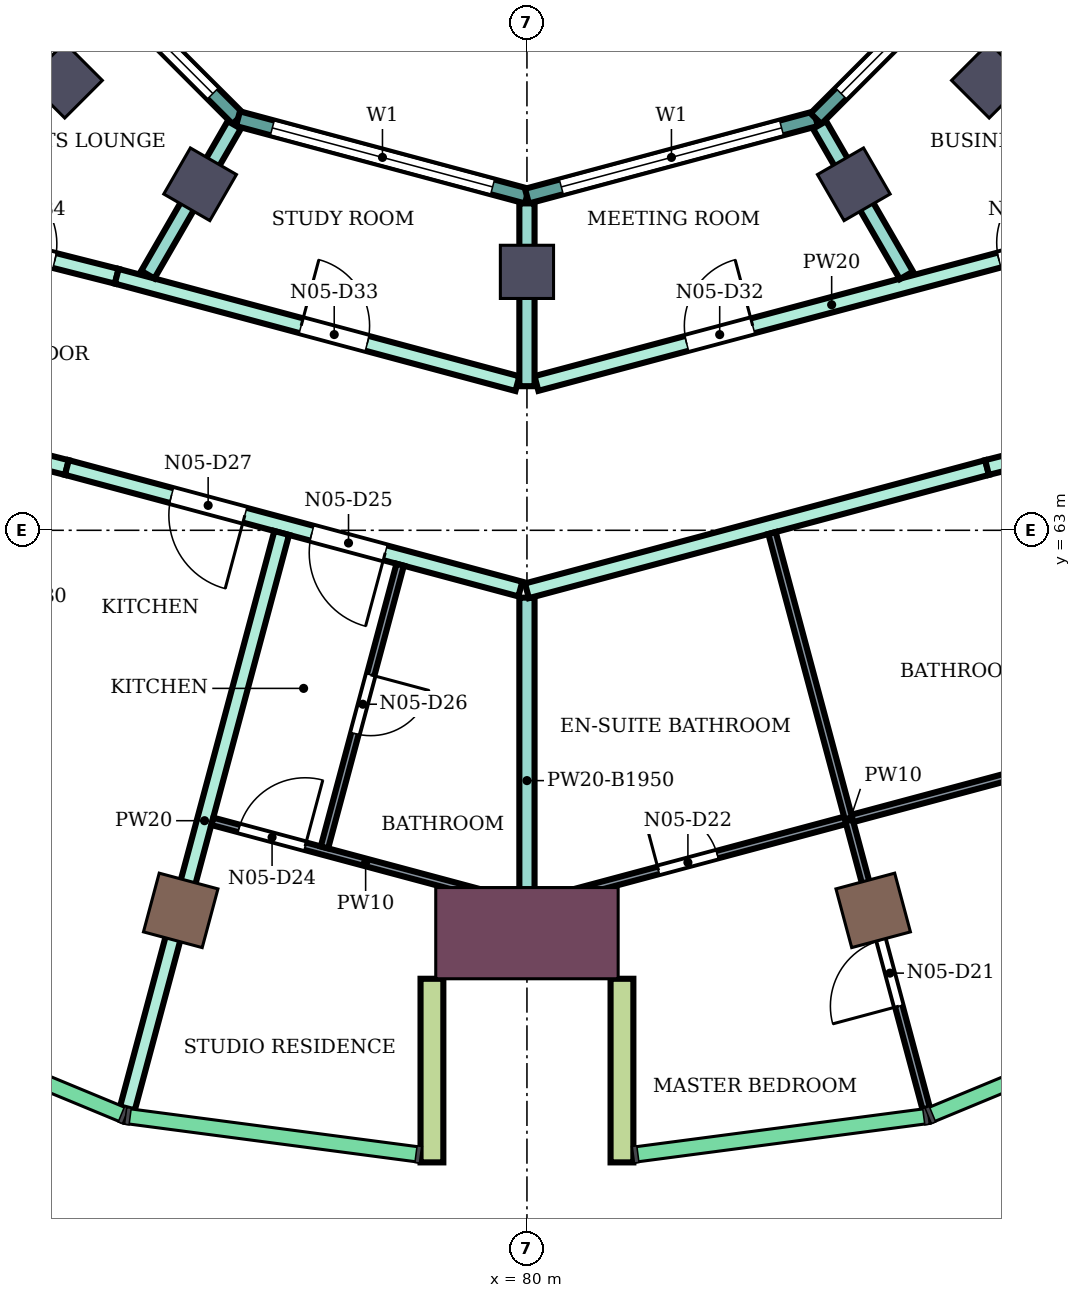
"""IFC4 building model, lengths in metres.
Left out: names, types, materials, properties, quantities, classifications, styles, units other than length and angle.
Written with IfcOpenShell. Run it as: python <this file> out.ifc"""

import sys

from ifc_helpers import new_model, si_unit, direction, frame, frame_2d, origin, origin_2d, place, context, subcontext, project, spatial, rectangle, extrude, element, fill, save


model = new_model("IFC4")
c1 = context("Model", 3, precision=1e-05, world=origin(), true_north=direction((0.0, 1.0)))
c2 = subcontext(c1, "Body", "Model", "MODEL_VIEW")
j1 = project(units=[si_unit("LENGTHUNIT", "METRE"), si_unit("PLANEANGLEUNIT", "RADIAN")], contexts=[c1])
p1 = place(None, origin())
s1 = spatial("IfcSite", under=j1, at=p1, CompositionType="ELEMENT")
p2 = place(p1, origin())
s2 = spatial("IfcBuilding", under=s1, at=p2, CompositionType="ELEMENT")
p3 = place(p2, frame((0.0, 0.0, 323.7)))
s3 = spatial("IfcBuildingStorey", under=s2, at=p3, CompositionType="ELEMENT", Elevation=323.7)
for number, where, z_axis, x_axis in (
    (1, (75.445, 58.0, 0.0), (0.0, 0.0, 1.0), (-0.259, -0.966, 0.0)),
    (2, (84.555, 58.0, 0.0), (0.0, 0.0, 1.0), (0.259, -0.966, 0.0)),
):
    element("IfcColumn", number, at=place(p3, frame(where, z_axis=z_axis, x_axis=x_axis)), inside=s3, PredefinedType="COLUMN", context=c2, shape_type="SweptSolid", body=[
        extrude(rectangle(XDim=0.8, YDim=0.8, at=origin_2d()), origin(), (0.0, 0.0, 1.0), 4.4),
    ])
for number, where, z_axis, x_axis in (
    (3, (73.919, 68.919, 0.0), (0.0, 0.0, 1.0), (-0.707, -0.707, 0.0)),
    (4, (75.7, 67.552, 0.0), (0.0, 0.0, 1.0), (-0.5, -0.866, 0.0)),
    (5, (80.0, 66.4, 0.0), (0.0, 0.0, 1.0), (0.0, -1.0, 0.0)),
    (6, (84.3, 67.552, 0.0), (0.0, 0.0, 1.0), (0.5, -0.866, 0.0)),
    (7, (86.081, 68.919, 0.0), (0.0, 0.0, 1.0), (0.707, -0.707, 0.0)),
):
    element("IfcColumn", number, at=place(p3, frame(where, z_axis=z_axis, x_axis=x_axis)), inside=s3, PredefinedType="COLUMN", context=c2, shape_type="SweptSolid", body=[
        extrude(rectangle(XDim=0.7, YDim=0.7, at=origin_2d()), origin(), (0.0, 0.0, 1.0), 4.4),
    ])
p4 = place(p3, frame((80.0, 57.7, 0.0), z_axis=(0.0, 0.0, 1.0), x_axis=(0.0, -1.0, 0.0)))
e8 = element("IfcColumn", 8, at=p4, inside=s3, PredefinedType="COLUMN", context=c2, shape_type="SweptSolid", body=[
    extrude(rectangle(XDim=1.2, YDim=2.4, at=origin_2d()), origin(), (0.0, 0.0, 1.0), 4.4),
])
for number, where, z_axis, x_axis in (
    (9, (78.75, 57.1, 0.0), (0.0, 0.0, 1.0), (0.0, -1.0, 0.0)),
    (10, (81.25, 57.1, 0.0), (0.0, 0.0, 1.0), (0.0, -1.0, 0.0)),
):
    element("IfcWall", number, at=place(p3, frame(where, z_axis=z_axis, x_axis=x_axis)), inside=s3, PredefinedType="NOTDEFINED", context=c2, shape_type="SweptSolid", body=[
        extrude(rectangle(XDim=2.416, YDim=0.3, at=frame_2d((1.208, 0.0))), origin(), (0.0, 0.0, 1.0), 4.4),
    ])
p5 = place(p3, frame((73.415, 71.198, 0.0), z_axis=(0.0, 0.0, 1.0), x_axis=(0.707106781187, -0.707106781187, 0.0)))
e11 = element("IfcWall", 11, at=p5, inside=s3, PredefinedType="NOTDEFINED", context=c2, shape_type="SweptSolid", body=[
    extrude(rectangle(XDim=3.936, YDim=0.2, at=frame_2d((1.968, 0.0))), origin(), (0.0, 0.0, 1.0), 4.4),
])
p6 = place(p5, frame((0.468, 0.0, 0.9)))
e12 = element("IfcOpeningElement", 12, at=p6, cuts=e11, PredefinedType="OPENING", context=c2, shape_type="SweptSolid", body=[
    extrude(rectangle(XDim=3.0, YDim=2.3, at=frame_2d((1.5, 1.15))), frame((0.0, 0.11, 0.0), z_axis=(0.0, -1.0, 0.0), x_axis=(1.0, 0.0, 0.0)), (0.0, 0.0, 1.0), 0.22),
])
p7 = place(p3, frame((76.198, 68.415, 0.0), z_axis=(0.0, 0.0, 1.0), x_axis=(0.965933654434, -0.258789828301, 0.0)))
e13 = element("IfcWall", 13, at=p7, inside=s3, PredefinedType="NOTDEFINED", context=c2, shape_type="SweptSolid", body=[
    extrude(rectangle(XDim=3.936, YDim=0.2, at=frame_2d((1.968, 0.0))), origin(), (0.0, 0.0, 1.0), 4.4),
])
p8 = place(p7, frame((0.468, 0.0, 0.9)))
e14 = element("IfcOpeningElement", 14, at=p8, cuts=e13, PredefinedType="OPENING", context=c2, shape_type="SweptSolid", body=[
    extrude(rectangle(XDim=3.0, YDim=2.3, at=frame_2d((1.5, 1.15))), frame((0.0, 0.11, 0.0), z_axis=(0.0, -1.0, 0.0), x_axis=(1.0, 0.0, 0.0)), (0.0, 0.0, 1.0), 0.22),
])
p9 = place(p3, frame((80.0, 67.396, 0.0), z_axis=(0.0, 0.0, 1.0), x_axis=(0.965933654434, 0.258789828301, 0.0)))
e15 = element("IfcWall", 15, at=p9, inside=s3, PredefinedType="NOTDEFINED", context=c2, shape_type="SweptSolid", body=[
    extrude(rectangle(XDim=3.936, YDim=0.2, at=frame_2d((1.968, 0.0))), origin(), (0.0, 0.0, 1.0), 4.4),
])
p10 = place(p9, frame((0.468, 0.0, 0.9)))
e16 = element("IfcOpeningElement", 16, at=p10, cuts=e15, PredefinedType="OPENING", context=c2, shape_type="SweptSolid", body=[
    extrude(rectangle(XDim=3.0, YDim=2.3, at=frame_2d((1.5, 1.15))), frame((0.0, 0.11, 0.0), z_axis=(0.0, -1.0, 0.0), x_axis=(1.0, 0.0, 0.0)), (0.0, 0.0, 1.0), 0.22),
])
p11 = place(p3, frame((83.802, 68.415, 0.0), z_axis=(0.0, 0.0, 1.0), x_axis=(0.707106781187, 0.707106781187, 0.0)))
e17 = element("IfcWall", 17, at=p11, inside=s3, PredefinedType="NOTDEFINED", context=c2, shape_type="SweptSolid", body=[
    extrude(rectangle(XDim=3.936, YDim=0.2, at=frame_2d((1.968, 0.0))), origin(), (0.0, 0.0, 1.0), 4.4),
])
p12 = place(p11, frame((0.468, 0.0, 0.9)))
e18 = element("IfcOpeningElement", 18, at=p12, cuts=e17, PredefinedType="OPENING", context=c2, shape_type="SweptSolid", body=[
    extrude(rectangle(XDim=3.0, YDim=2.3, at=frame_2d((1.5, 1.15))), frame((0.0, 0.11, 0.0), z_axis=(0.0, -1.0, 0.0), x_axis=(1.0, 0.0, 0.0)), (0.0, 0.0, 1.0), 0.22),
])
p13 = place(p3, frame((68.201, 65.28, 0.0), z_axis=(0.0, 0.0, 1.0), x_axis=(0.969421088032, -0.245403247897, 0.0)))
e19 = element("IfcWall", 19, at=p13, inside=s3, PredefinedType="PARTITIONING", context=c2, shape_type="SweptSolid", body=[
    extrude(rectangle(XDim=5.927, YDim=0.2, at=frame_2d((2.964, 0.0))), origin(), (0.0, 0.0, 1.0), 3.95),
])
p14 = place(p3, frame((72.1, 66.975, 0.0), z_axis=(0.0, 0.0, 1.0), x_axis=(0.969471314457, -0.245204752086, 0.0)))
e20 = element("IfcWall", 20, at=p14, inside=s3, PredefinedType="PARTITIONING", context=c2, shape_type="SweptSolid", body=[
    extrude(rectangle(XDim=2.582, YDim=0.2, at=frame_2d((1.291, 0.0))), origin(), (0.0, 0.0, 1.0), 3.95),
])
p15 = place(p14, frame((0.841, 0.0, 0.0)))
e21 = element("IfcOpeningElement", 21, at=p15, cuts=e20, PredefinedType="OPENING", context=c2, shape_type="SweptSolid", body=[
    extrude(rectangle(XDim=0.9, YDim=2.1, at=frame_2d((0.45, 1.05))), frame((0.0, 0.11, 0.0), z_axis=(0.0, -1.0, 0.0), x_axis=(1.0, 0.0, 0.0)), (0.0, 0.0, 1.0), 0.22),
])
p16 = place(p3, frame((73.947, 63.826, 0.0), z_axis=(0.0, 0.0, 1.0), x_axis=(0.965894934009, -0.25893430915, 0.0)))
e22 = element("IfcWall", 22, at=p16, inside=s3, PredefinedType="PARTITIONING", context=c2, shape_type="SweptSolid", body=[
    extrude(rectangle(XDim=6.177, YDim=0.2, at=frame_2d((3.088, 0.0))), origin(), (0.0, 0.0, 1.0), 3.95),
])
p17 = place(p16, frame((3.336, 0.0, 0.0)))
e23 = element("IfcOpeningElement", 23, at=p17, cuts=e22, PredefinedType="OPENING", context=c2, shape_type="SweptSolid", body=[
    extrude(rectangle(XDim=1.0, YDim=2.1, at=frame_2d((0.5, 1.05))), frame((0.0, 0.11, 0.0), z_axis=(0.0, -1.0, 0.0), x_axis=(1.0, 0.0, 0.0)), (0.0, 0.0, 1.0), 0.22),
])
p18 = place(p16, frame((1.424, 0.0, 0.0)))
e24 = element("IfcOpeningElement", 24, at=p18, cuts=e22, PredefinedType="OPENING", context=c2, shape_type="SweptSolid", body=[
    extrude(rectangle(XDim=1.0, YDim=2.1, at=frame_2d((0.5, 1.05))), frame((0.0, 0.11, 0.0), z_axis=(0.0, -1.0, 0.0), x_axis=(1.0, 0.0, 0.0)), (0.0, 0.0, 1.0), 0.22),
])
p19 = place(p3, frame((74.603, 66.342, 0.0), z_axis=(0.0, 0.0, 1.0), x_axis=(0.965920893652, -0.258837453254, 0.0)))
e25 = element("IfcWall", 25, at=p19, inside=s3, PredefinedType="PARTITIONING", context=c2, shape_type="SweptSolid", body=[
    extrude(rectangle(XDim=5.458, YDim=0.2, at=frame_2d((2.729, 0.0))), origin(), (0.0, 0.0, 1.0), 3.95),
])
p20 = place(p19, frame((2.512, 0.0, 0.0)))
e26 = element("IfcOpeningElement", 26, at=p20, cuts=e25, PredefinedType="OPENING", context=c2, shape_type="SweptSolid", body=[
    extrude(rectangle(XDim=0.9, YDim=2.1, at=frame_2d((0.45, 1.05))), frame((0.0, 0.11, 0.0), z_axis=(0.0, -1.0, 0.0), x_axis=(1.0, 0.0, 0.0)), (0.0, 0.0, 1.0), 0.22),
])
p21 = place(p3, frame((74.743, 55.394, 0.0), z_axis=(0.0, 0.0, 1.0), x_axis=(0.258969103378, 0.965885605802, 0.0)))
e27 = element("IfcWall", 27, at=p21, inside=s3, PredefinedType="PARTITIONING", context=c2, shape_type="SweptSolid", body=[
    extrude(rectangle(XDim=7.838, YDim=0.2, at=frame_2d((3.919, 0.0))), origin(), (0.0, 0.0, 1.0), 3.95),
])
p22 = place(p3, frame((75.012, 66.363, 0.0), z_axis=(0.0, 0.0, 1.0), x_axis=(0.500143511652, 0.865942531438, 0.0)))
e28 = element("IfcWall", 28, at=p22, inside=s3, PredefinedType="PARTITIONING", context=c2, shape_type="SweptSolid", body=[
    extrude(rectangle(XDim=2.275, YDim=0.2, at=frame_2d((1.138, 0.0))), origin(), (0.0, 0.0, 1.0), 2.45),
])
p23 = place(p3, frame((80.125, 64.932, 0.0), z_axis=(0.0, 0.0, 1.0), x_axis=(0.966236955806, 0.257655089674, 0.0)))
e29 = element("IfcWall", 29, at=p23, inside=s3, PredefinedType="PARTITIONING", context=c2, shape_type="SweptSolid", body=[
    extrude(rectangle(XDim=8.039, YDim=0.2, at=frame_2d((4.02, 0.0))), origin(), (0.0, 0.0, 1.0), 3.95),
])
p24 = place(p23, frame((6.298, 0.0, 0.0)))
e30 = element("IfcOpeningElement", 30, at=p24, cuts=e29, PredefinedType="OPENING", context=c2, shape_type="SweptSolid", body=[
    extrude(rectangle(XDim=0.9, YDim=2.1, at=frame_2d((0.45, 1.05))), frame((0.0, 0.11, 0.0), z_axis=(0.0, -1.0, 0.0), x_axis=(1.0, 0.0, 0.0)), (0.0, 0.0, 1.0), 0.22),
])
p25 = place(p23, frame((2.045, 0.0, 0.0)))
e31 = element("IfcOpeningElement", 31, at=p25, cuts=e29, PredefinedType="OPENING", context=c2, shape_type="SweptSolid", body=[
    extrude(rectangle(XDim=0.9, YDim=2.1, at=frame_2d((0.45, 1.05))), frame((0.0, 0.11, 0.0), z_axis=(0.0, -1.0, 0.0), x_axis=(1.0, 0.0, 0.0)), (0.0, 0.0, 1.0), 0.22),
])
p26 = place(p3, frame((80.0, 57.3, 0.0), z_axis=(0.0, 0.0, 1.0), x_axis=(0.0, 1.0, 0.0)))
e32 = element("IfcWall", 32, at=p26, inside=s3, PredefinedType="PARTITIONING", context=c2, shape_type="SweptSolid", body=[
    extrude(rectangle(XDim=4.814, YDim=0.2, at=frame_2d((2.407, 0.0))), origin(), (0.0, 0.0, 1.0), 2.45),
])
p27 = place(p3, frame((80.0, 62.204, 0.0), z_axis=(0.0, 0.0, 1.0), x_axis=(0.965938139786, 0.258773086132, 0.0)))
e33 = element("IfcWall", 33, at=p27, inside=s3, PredefinedType="PARTITIONING", context=c2, shape_type="SweptSolid", body=[
    extrude(rectangle(XDim=6.266, YDim=0.2, at=frame_2d((3.133, 0.0))), origin(), (0.0, 0.0, 1.0), 3.95),
])
p28 = place(p3, frame((80.0, 64.896, 0.0), z_axis=(0.0, 0.0, 1.0), x_axis=(0.0, 1.0, 0.0)))
e34 = element("IfcWall", 34, at=p28, inside=s3, PredefinedType="PARTITIONING", context=c2, shape_type="SweptSolid", body=[
    extrude(rectangle(XDim=2.405, YDim=0.2, at=frame_2d((1.203, 0.0))), origin(), (0.0, 0.0, 1.0), 2.45),
])
p29 = place(p3, frame((83.85, 68.333, 0.0), z_axis=(0.0, 0.0, 1.0), x_axis=(0.500080019051, -0.865979199835, 0.0)))
e35 = element("IfcWall", 35, at=p29, inside=s3, PredefinedType="PARTITIONING", context=c2, shape_type="SweptSolid", body=[
    extrude(rectangle(XDim=2.285, YDim=0.2, at=frame_2d((1.143, 0.0))), origin(), (0.0, 0.0, 1.0), 2.45),
])
p30 = place(p3, frame((86.053, 63.826, 0.0), z_axis=(0.0, 0.0, 1.0), x_axis=(0.969480070232, 0.245170131586, 0.0)))
e36 = element("IfcWall", 36, at=p30, inside=s3, PredefinedType="PARTITIONING", context=c2, shape_type="SweptSolid", body=[
    extrude(rectangle(XDim=5.907, YDim=0.2, at=frame_2d((2.954, 0.0))), origin(), (0.0, 0.0, 1.0), 3.95),
])
p31 = place(p30, frame((0.889, 0.0, 0.0)))
e37 = element("IfcOpeningElement", 37, at=p31, cuts=e36, PredefinedType="OPENING", context=c2, shape_type="SweptSolid", body=[
    extrude(rectangle(XDim=1.0, YDim=2.1, at=frame_2d((0.5, 1.05))), frame((0.0, 0.11, 0.0), z_axis=(0.0, -1.0, 0.0), x_axis=(1.0, 0.0, 0.0)), (0.0, 0.0, 1.0), 0.22),
])
p32 = place(p3, frame((75.862, 59.171, 0.0), z_axis=(0.0, 0.0, 1.0), x_axis=(0.965961623338, -0.258685411723, 0.0)))
e38 = element("IfcWall", 38, at=p32, inside=s3, PredefinedType="PARTITIONING", context=c2, shape_type="SweptSolid", body=[
    extrude(rectangle(XDim=4.174, YDim=0.1, at=frame_2d((2.087, 0.0))), origin(), (0.0, 0.0, 1.0), 3.95),
])
p33 = place(p32, frame((0.363, 0.0, 0.0)))
e39 = element("IfcOpeningElement", 39, at=p33, cuts=e38, PredefinedType="OPENING", context=c2, shape_type="SweptSolid", body=[
    extrude(rectangle(XDim=0.9, YDim=2.1, at=frame_2d((0.45, 1.05))), frame((0.0, 0.06, 0.0), z_axis=(0.0, -1.0, 0.0), x_axis=(1.0, 0.0, 0.0)), (0.0, 0.0, 1.0), 0.12),
])
p34 = place(p3, frame((77.336, 58.828, 0.0), z_axis=(0.0, 0.0, 1.0), x_axis=(0.25872023695, 0.965952296437, 0.0)))
e40 = element("IfcWall", 40, at=p34, inside=s3, PredefinedType="PARTITIONING", context=c2, shape_type="SweptSolid", body=[
    extrude(rectangle(XDim=3.85, YDim=0.1, at=frame_2d((1.925, 0.0))), origin(), (0.0, 0.0, 1.0), 3.95),
])
p35 = place(p34, frame((1.55, 0.0, 0.0)))
e41 = element("IfcOpeningElement", 41, at=p35, cuts=e40, PredefinedType="OPENING", context=c2, shape_type="SweptSolid", body=[
    extrude(rectangle(XDim=0.8, YDim=2.1, at=frame_2d((0.4, 1.05))), frame((0.0, 0.06, 0.0), z_axis=(0.0, -1.0, 0.0), x_axis=(1.0, 0.0, 0.0)), (0.0, 0.0, 1.0), 0.12),
])
p36 = place(p3, frame((80.106, 58.092, 0.0), z_axis=(0.0, 0.0, 1.0), x_axis=(0.965971139599, 0.258649874274, 0.0)))
e42 = element("IfcWall", 42, at=p36, inside=s3, PredefinedType="PARTITIONING", context=c2, shape_type="SweptSolid", body=[
    extrude(rectangle(XDim=8.588, YDim=0.1, at=frame_2d((4.294, 0.0))), origin(), (0.0, 0.0, 1.0), 3.95),
])
p37 = place(p36, frame((1.682, 0.0, 0.0)))
e43 = element("IfcOpeningElement", 43, at=p37, cuts=e42, PredefinedType="OPENING", context=c2, shape_type="SweptSolid", body=[
    extrude(rectangle(XDim=0.8, YDim=2.1, at=frame_2d((0.4, 1.05))), frame((0.0, 0.06, 0.0), z_axis=(0.0, -1.0, 0.0), x_axis=(1.0, 0.0, 0.0)), (0.0, 0.0, 1.0), 0.12),
])
p38 = place(p3, frame((83.224, 62.964, 0.0), z_axis=(0.0, 0.0, 1.0), x_axis=(0.258779160476, -0.96593651246, 0.0)))
e44 = element("IfcWall", 44, at=p38, inside=s3, PredefinedType="PARTITIONING", context=c2, shape_type="SweptSolid", body=[
    extrude(rectangle(XDim=7.838, YDim=0.1, at=frame_2d((3.919, 0.0))), origin(), (0.0, 0.0, 1.0), 3.95),
])
p39 = place(p38, frame((5.544, 0.0, 0.0)))
e45 = element("IfcOpeningElement", 45, at=p39, cuts=e44, PredefinedType="OPENING", context=c2, shape_type="SweptSolid", body=[
    extrude(rectangle(XDim=0.9, YDim=2.1, at=frame_2d((0.45, 1.05))), frame((0.0, 0.06, 0.0), z_axis=(0.0, -1.0, 0.0), x_axis=(1.0, 0.0, 0.0)), (0.0, 0.0, 1.0), 0.12),
])
p40 = place(p6, origin())
e46 = element("IfcWindow", 46, at=p40, inside=s3, PartitioningType="SINGLE_PANEL", PredefinedType="WINDOW", context=c2, shape_type="SweptSolid", body=[
    extrude(rectangle(XDim=3.0, YDim=2.3, at=frame_2d((1.5, 1.15))), frame((0.0, 0.03, 0.0), z_axis=(0.0, -1.0, 0.0), x_axis=(1.0, 0.0, 0.0)), (0.0, 0.0, 1.0), 0.06),
])
fill(e12, e46)
p41 = place(p8, origin())
e47 = element("IfcWindow", 47, at=p41, inside=s3, PartitioningType="SINGLE_PANEL", PredefinedType="WINDOW", context=c2, shape_type="SweptSolid", body=[
    extrude(rectangle(XDim=3.0, YDim=2.3, at=frame_2d((1.5, 1.15))), frame((0.0, 0.03, 0.0), z_axis=(0.0, -1.0, 0.0), x_axis=(1.0, 0.0, 0.0)), (0.0, 0.0, 1.0), 0.06),
])
fill(e14, e47)
p42 = place(p10, origin())
e48 = element("IfcWindow", 48, at=p42, inside=s3, PartitioningType="SINGLE_PANEL", PredefinedType="WINDOW", context=c2, shape_type="SweptSolid", body=[
    extrude(rectangle(XDim=3.0, YDim=2.3, at=frame_2d((1.5, 1.15))), frame((0.0, 0.03, 0.0), z_axis=(0.0, -1.0, 0.0), x_axis=(1.0, 0.0, 0.0)), (0.0, 0.0, 1.0), 0.06),
])
fill(e16, e48)
p43 = place(p12, origin())
e49 = element("IfcWindow", 49, at=p43, inside=s3, PartitioningType="SINGLE_PANEL", PredefinedType="WINDOW", context=c2, shape_type="SweptSolid", body=[
    extrude(rectangle(XDim=3.0, YDim=2.3, at=frame_2d((1.5, 1.15))), frame((0.0, 0.03, 0.0), z_axis=(0.0, -1.0, 0.0), x_axis=(1.0, 0.0, 0.0)), (0.0, 0.0, 1.0), 0.06),
])
fill(e18, e49)
p44 = place(p39, frame((0.9, 0.0, 0.0), z_axis=(0.0, 0.0, 1.0), x_axis=(-1.0, 0.0, 0.0)))
e50 = element("IfcDoor", 50, at=p44, inside=s3, OperationType="SINGLE_SWING_LEFT", PredefinedType="DOOR", context=c2, shape_type="SweptSolid", body=[
    extrude(rectangle(XDim=0.9, YDim=2.1, at=frame_2d((0.45, 1.05))), frame((0.0, 0.025, 0.0), z_axis=(0.0, -1.0, 0.0), x_axis=(1.0, 0.0, 0.0)), (0.0, 0.0, 1.0), 0.05),
])
fill(e45, e50)
p45 = place(p37, origin())
e51 = element("IfcDoor", 51, at=p45, inside=s3, OperationType="SINGLE_SWING_LEFT", PredefinedType="DOOR", context=c2, shape_type="SweptSolid", body=[
    extrude(rectangle(XDim=0.8, YDim=2.1, at=frame_2d((0.4, 1.05))), frame((0.0, 0.025, 0.0), z_axis=(0.0, -1.0, 0.0), x_axis=(1.0, 0.0, 0.0)), (0.0, 0.0, 1.0), 0.05),
])
fill(e43, e51)
p46 = place(p33, origin())
e52 = element("IfcDoor", 52, at=p46, inside=s3, OperationType="SINGLE_SWING_RIGHT", PredefinedType="DOOR", context=c2, shape_type="SweptSolid", body=[
    extrude(rectangle(XDim=0.9, YDim=2.1, at=frame_2d((0.45, 1.05))), frame((0.0, 0.025, 0.0), z_axis=(0.0, -1.0, 0.0), x_axis=(1.0, 0.0, 0.0)), (0.0, 0.0, 1.0), 0.05),
])
fill(e39, e52)
p47 = place(p17, frame((1.0, 0.0, 0.0), z_axis=(0.0, 0.0, 1.0), x_axis=(-1.0, 0.0, 0.0)))
e53 = element("IfcDoor", 53, at=p47, inside=s3, OperationType="SINGLE_SWING_LEFT", PredefinedType="DOOR", context=c2, shape_type="SweptSolid", body=[
    extrude(rectangle(XDim=1.0, YDim=2.1, at=frame_2d((0.5, 1.05))), frame((0.0, 0.025, 0.0), z_axis=(0.0, -1.0, 0.0), x_axis=(1.0, 0.0, 0.0)), (0.0, 0.0, 1.0), 0.05),
])
fill(e23, e53)
p48 = place(p35, frame((0.8, 0.0, 0.0), z_axis=(0.0, 0.0, 1.0), x_axis=(-1.0, 0.0, 0.0)))
e54 = element("IfcDoor", 54, at=p48, inside=s3, OperationType="SINGLE_SWING_LEFT", PredefinedType="DOOR", context=c2, shape_type="SweptSolid", body=[
    extrude(rectangle(XDim=0.8, YDim=2.1, at=frame_2d((0.4, 1.05))), frame((0.0, 0.025, 0.0), z_axis=(0.0, -1.0, 0.0), x_axis=(1.0, 0.0, 0.0)), (0.0, 0.0, 1.0), 0.05),
])
fill(e41, e54)
p49 = place(p18, frame((1.0, 0.0, 0.0), z_axis=(0.0, 0.0, 1.0), x_axis=(-1.0, 0.0, 0.0)))
e55 = element("IfcDoor", 55, at=p49, inside=s3, OperationType="SINGLE_SWING_LEFT", PredefinedType="DOOR", context=c2, shape_type="SweptSolid", body=[
    extrude(rectangle(XDim=1.0, YDim=2.1, at=frame_2d((0.5, 1.05))), frame((0.0, 0.025, 0.0), z_axis=(0.0, -1.0, 0.0), x_axis=(1.0, 0.0, 0.0)), (0.0, 0.0, 1.0), 0.05),
])
fill(e24, e55)
p50 = place(p24, origin())
e56 = element("IfcDoor", 56, at=p50, inside=s3, OperationType="SINGLE_SWING_RIGHT", PredefinedType="DOOR", context=c2, shape_type="SweptSolid", body=[
    extrude(rectangle(XDim=0.9, YDim=2.1, at=frame_2d((0.45, 1.05))), frame((0.0, 0.025, 0.0), z_axis=(0.0, -1.0, 0.0), x_axis=(1.0, 0.0, 0.0)), (0.0, 0.0, 1.0), 0.05),
])
fill(e30, e56)
p51 = place(p25, origin())
e57 = element("IfcDoor", 57, at=p51, inside=s3, OperationType="SINGLE_SWING_RIGHT", PredefinedType="DOOR", context=c2, shape_type="SweptSolid", body=[
    extrude(rectangle(XDim=0.9, YDim=2.1, at=frame_2d((0.45, 1.05))), frame((0.0, 0.025, 0.0), z_axis=(0.0, -1.0, 0.0), x_axis=(1.0, 0.0, 0.0)), (0.0, 0.0, 1.0), 0.05),
])
fill(e31, e57)
p52 = place(p20, origin())
e58 = element("IfcDoor", 58, at=p52, inside=s3, OperationType="SINGLE_SWING_LEFT", PredefinedType="DOOR", context=c2, shape_type="SweptSolid", body=[
    extrude(rectangle(XDim=0.9, YDim=2.1, at=frame_2d((0.45, 1.05))), frame((0.0, 0.025, 0.0), z_axis=(0.0, -1.0, 0.0), x_axis=(1.0, 0.0, 0.0)), (0.0, 0.0, 1.0), 0.05),
])
fill(e26, e58)
p53 = place(p15, origin())
e59 = element("IfcDoor", 59, at=p53, inside=s3, OperationType="SINGLE_SWING_LEFT", PredefinedType="DOOR", context=c2, shape_type="SweptSolid", body=[
    extrude(rectangle(XDim=0.9, YDim=2.1, at=frame_2d((0.45, 1.05))), frame((0.0, 0.025, 0.0), z_axis=(0.0, -1.0, 0.0), x_axis=(1.0, 0.0, 0.0)), (0.0, 0.0, 1.0), 0.05),
])
fill(e21, e59)
save(model, sys.argv[1])
